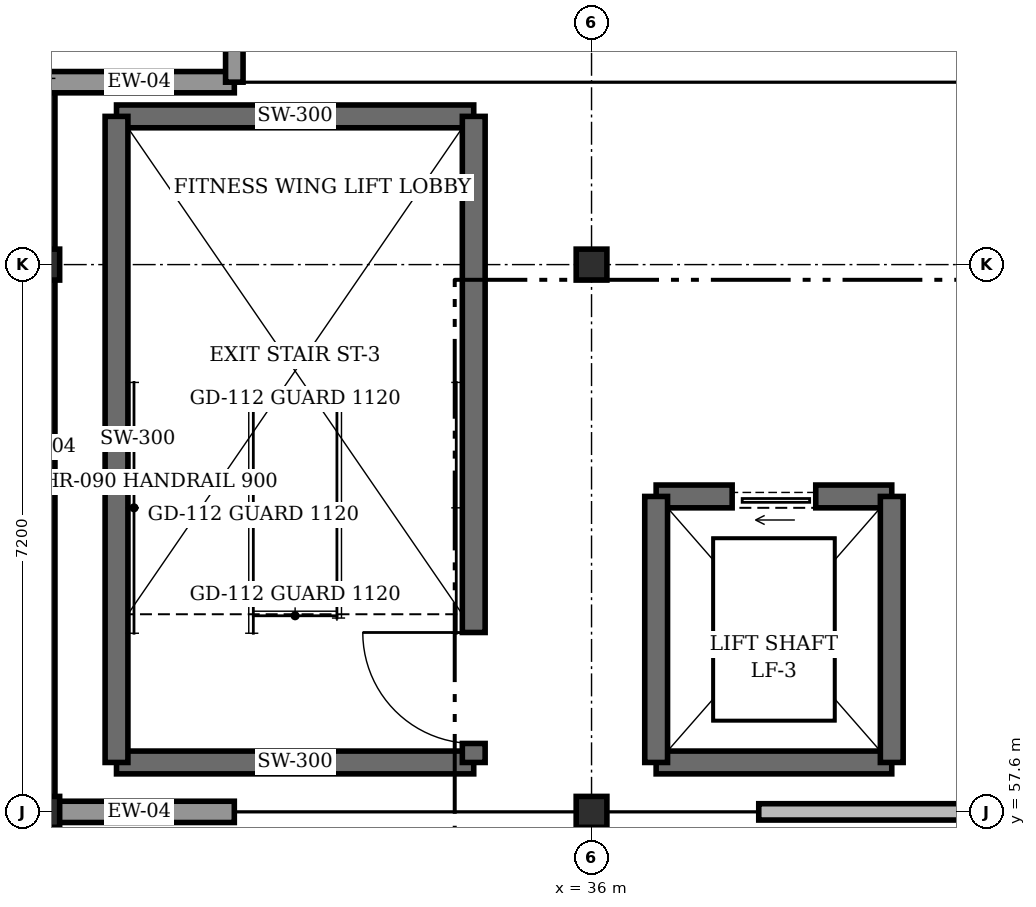
"""IFC4 building model, lengths in metres.
Left out: names, types, materials, properties, quantities, classifications, styles, units other than length and angle.
Written with IfcOpenShell. Run it as: python <this file> out.ifc"""

import sys

from ifc_helpers import new_model, si_unit, direction, frame, frame_2d, origin, origin_2d, place, context, subcontext, project, spatial, rectangle, i_section, extrude, element, fill, save


model = new_model("IFC4")
c1 = context("Model", 3, precision=1e-05, world=origin(), true_north=direction((0.0, 1.0)))
c2 = subcontext(c1, "Body", "Model", "MODEL_VIEW")
j1 = project(units=[si_unit("LENGTHUNIT", "METRE"), si_unit("PLANEANGLEUNIT", "RADIAN")], contexts=[c1])
p1 = place(None, origin())
s1 = spatial("IfcSite", under=j1, at=p1, CompositionType="ELEMENT")
p2 = place(p1, origin())
s2 = spatial("IfcBuilding", under=s1, at=p2, CompositionType="ELEMENT")
p3 = place(p2, frame((0.0, 0.0, 6.0)))
s3 = spatial("IfcBuildingStorey", under=s2, at=p3, CompositionType="ELEMENT", Elevation=6.0)
for number, where, z_axis, x_axis in (
    (1, (28.8, 57.6, 0.0), (0.0, 0.0, 1.0), (1.0, 0.0, 0.0)),
    (2, (28.8, 64.8, 0.0), (0.0, 0.0, 1.0), (1.0, 0.0, 0.0)),
    (3, (36.0, 57.6, 0.0), (0.0, 0.0, 1.0), (1.0, 0.0, 0.0)),
    (4, (36.0, 64.8, 0.0), (0.0, 0.0, 1.0), (1.0, 0.0, 0.0)),
):
    element("IfcColumn", number, at=place(p3, frame(where, z_axis=z_axis, x_axis=x_axis)), inside=s3, PredefinedType="COLUMN", context=c2, shape_type="SweptSolid", body=[
        extrude(i_section(OverallWidth=0.404, OverallDepth=0.407, WebThickness=0.027, FlangeThickness=0.044, at=origin_2d()), origin(), (0.0, 0.0, 1.0), 4.2),
    ])
p4 = place(p3, frame((28.8, 67.2, 0.0), z_axis=(0.0, 0.0, 1.0), x_axis=(0.0, -1.0, 0.0)))
e5 = element("IfcWall", 5, at=p4, inside=s3, PredefinedType="STANDARD", context=c2, shape_type="SweptSolid", body=[
    extrude(rectangle(XDim=9.6, YDim=0.28, at=frame_2d((4.8, 0.0))), origin(), (0.0, 0.0, 1.0), 3.0),
])
for number, where, z_axis, x_axis in (
    (6, (31.3, 67.2, 0.0), (0.0, 0.0, 1.0), (-1.0, 0.0, 0.0)),
    (7, (28.8, 57.6, 0.0), (0.0, 0.0, 1.0), (1.0, 0.0, 0.0)),
):
    element("IfcWall", number, at=place(p3, frame(where, z_axis=z_axis, x_axis=x_axis)), inside=s3, PredefinedType="STANDARD", context=c2, shape_type="SweptSolid", body=[
        extrude(rectangle(XDim=2.5, YDim=0.28, at=frame_2d((1.25, 0.0))), origin(), (0.0, 0.0, 1.0), 3.0),
    ])
p5 = place(p3, frame((31.3, 74.4, 0.0), z_axis=(0.0, 0.0, 1.0), x_axis=(0.0, -1.0, 0.0)))
e8 = element("IfcWall", 8, at=p5, inside=s3, PredefinedType="STANDARD", context=c2, shape_type="SweptSolid", body=[
    extrude(rectangle(XDim=7.2, YDim=0.23, at=frame_2d((3.6, 0.0))), origin(), (0.0, 0.0, 1.0), 3.247),
])
p6 = place(p5, frame((2.88, 0.0, 0.0)))
e9 = element("IfcOpeningElement", 9, at=p6, cuts=e8, PredefinedType="OPENING", context=c2, shape_type="SweptSolid", body=[
    extrude(rectangle(XDim=1.44, YDim=2.24, at=frame_2d((0.72, 1.12))), frame((0.0, 0.125, 0.0), z_axis=(0.0, -1.0, 0.0), x_axis=(1.0, 0.0, 0.0)), (0.0, 0.0, 1.0), 0.25),
])
for number, where, z_axis, x_axis in (
    (10, (29.75, 58.25, 0.0), (0.0, 0.0, 1.0), (1.0, 0.0, 0.0)),
    (11, (34.45, 66.75, 0.0), (0.0, 0.0, 1.0), (-1.0, 0.0, 0.0)),
):
    element("IfcWall", number, at=place(p3, frame(where, z_axis=z_axis, x_axis=x_axis)), inside=s3, PredefinedType="SHEAR", context=c2, shape_type="SweptSolid", body=[
        extrude(rectangle(XDim=4.7, YDim=0.3, at=frame_2d((2.35, 0.0))), origin(), (0.0, 0.0, 1.0), 3.94),
    ])
p7 = place(p3, frame((29.75, 66.75, 0.0), z_axis=(0.0, 0.0, 1.0), x_axis=(0.0, -1.0, 0.0)))
e12 = element("IfcWall", 12, at=p7, inside=s3, PredefinedType="SHEAR", context=c2, shape_type="SweptSolid", body=[
    extrude(rectangle(XDim=8.5, YDim=0.3, at=frame_2d((4.25, 0.0))), origin(), (0.0, 0.0, 1.0), 3.94),
])
p8 = place(p3, frame((34.45, 58.25, 0.0), z_axis=(0.0, 0.0, 1.0), x_axis=(0.0, 1.0, 0.0)))
e13 = element("IfcWall", 13, at=p8, inside=s3, PredefinedType="SHEAR", context=c2, shape_type="SweptSolid", body=[
    extrude(rectangle(XDim=8.5, YDim=0.3, at=frame_2d((4.25, 0.0))), origin(), (0.0, 0.0, 1.0), 3.94),
])
p9 = place(p8, frame((0.25, 0.0, 0.0)))
e14 = element("IfcOpeningElement", 14, at=p9, cuts=e13, PredefinedType="OPENING", context=c2, shape_type="SweptSolid", body=[
    extrude(rectangle(XDim=1.46, YDim=2.24, at=frame_2d((0.73, 1.12))), frame((0.0, 0.16, 0.0), z_axis=(0.0, -1.0, 0.0), x_axis=(1.0, 0.0, 0.0)), (0.0, 0.0, 1.0), 0.32),
])
p10 = place(p3, frame((36.85, 58.25, 0.0), z_axis=(0.0, 0.0, 1.0), x_axis=(1.0, 0.0, 0.0)))
e15 = element("IfcWall", 15, at=p10, inside=s3, PredefinedType="SHEAR", context=c2, shape_type="SweptSolid", body=[
    extrude(rectangle(XDim=3.1, YDim=0.3, at=frame_2d((1.55, 0.0))), origin(), (0.0, 0.0, 1.0), 3.94),
])
p11 = place(p3, frame((39.95, 61.75, 0.0), z_axis=(0.0, 0.0, 1.0), x_axis=(-1.0, 0.0, 0.0)))
e16 = element("IfcWall", 16, at=p11, inside=s3, PredefinedType="SHEAR", context=c2, shape_type="SweptSolid", body=[
    extrude(rectangle(XDim=3.1, YDim=0.3, at=frame_2d((1.55, 0.0))), origin(), (0.0, 0.0, 1.0), 3.94),
])
p12 = place(p11, frame((1.0, 0.0, 0.0)))
e17 = element("IfcOpeningElement", 17, at=p12, cuts=e16, PredefinedType="OPENING", context=c2, shape_type="SweptSolid", body=[
    extrude(rectangle(XDim=1.1, YDim=2.22, at=frame_2d((0.55, 1.11))), frame((0.0, 0.16, 0.0), z_axis=(0.0, -1.0, 0.0), x_axis=(1.0, 0.0, 0.0)), (0.0, 0.0, 1.0), 0.32),
])
for number, where, z_axis, x_axis in (
    (18, (36.85, 61.75, 0.0), (0.0, 0.0, 1.0), (0.0, -1.0, 0.0)),
    (19, (39.95, 58.25, 0.0), (0.0, 0.0, 1.0), (0.0, 1.0, 0.0)),
):
    element("IfcWall", number, at=place(p3, frame(where, z_axis=z_axis, x_axis=x_axis)), inside=s3, PredefinedType="SHEAR", context=c2, shape_type="SweptSolid", body=[
        extrude(rectangle(XDim=3.5, YDim=0.3, at=frame_2d((1.75, 0.0))), origin(), (0.0, 0.0, 1.0), 3.94),
    ])
p13 = place(p3, frame((38.2, 57.6, 0.0), z_axis=(0.0, 0.0, 1.0), x_axis=(1.0, 0.0, 0.0)))
e20 = element("IfcWall", 20, at=p13, inside=s3, PredefinedType="STANDARD", context=c2, shape_type="SweptSolid", body=[
    extrude(rectangle(XDim=8.8, YDim=0.215, at=frame_2d((4.4, 0.0))), origin(), (0.0, 0.0, 1.0), 3.028),
])
p14 = place(p13, frame((6.55, 0.0, 0.0)))
e21 = element("IfcOpeningElement", 21, at=p14, cuts=e20, PredefinedType="OPENING", context=c2, shape_type="SweptSolid", body=[
    extrude(rectangle(XDim=1.46, YDim=2.26, at=frame_2d((0.73, 1.13))), frame((0.0, 0.117, 0.0), z_axis=(0.0, -1.0, 0.0), x_axis=(1.0, 0.0, 0.0)), (0.0, 0.0, 1.0), 0.235),
])
p15 = place(p9, origin())
e22 = element("IfcDoor", 22, at=p15, inside=s3, OperationType="SINGLE_SWING_RIGHT", PredefinedType="DOOR", context=c2, shape_type="SweptSolid", body=[
    extrude(rectangle(XDim=1.46, YDim=2.24, at=frame_2d((0.73, 1.12))), frame((0.0, 0.025, 0.0), z_axis=(0.0, -1.0, 0.0), x_axis=(1.0, 0.0, 0.0)), (0.0, 0.0, 1.0), 0.05),
])
fill(e14, e22)
p16 = place(p12, origin())
e23 = element("IfcDoor", 23, at=p16, inside=s3, OperationType="SLIDING_TO_LEFT", PredefinedType="DOOR", context=c2, shape_type="SweptSolid", body=[
    extrude(rectangle(XDim=1.1, YDim=2.22, at=frame_2d((0.55, 1.11))), frame((0.0, 0.025, 0.0), z_axis=(0.0, -1.0, 0.0), x_axis=(1.0, 0.0, 0.0)), (0.0, 0.0, 1.0), 0.05),
])
fill(e17, e23)
save(model, sys.argv[1])
